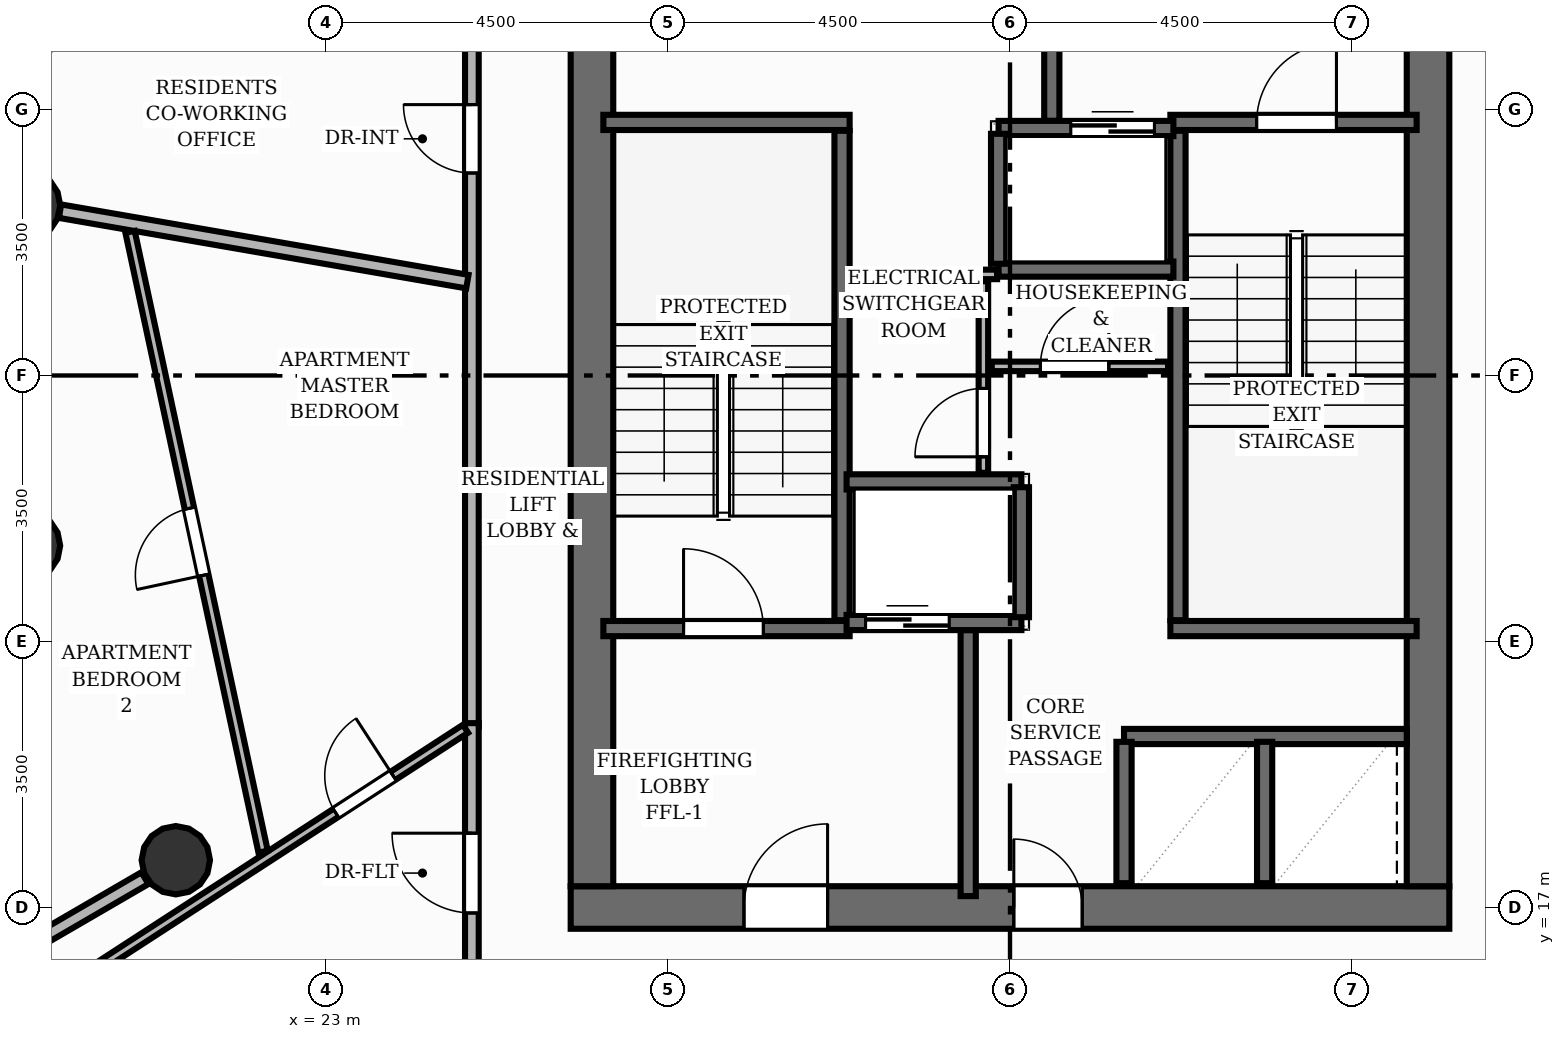
"""IFC4 building model, lengths in metres.
Left out: names, types, materials, properties, quantities, classifications, styles, units other than length and angle.
Written with IfcOpenShell. Run it as: python <this file> out.ifc"""

import sys

from ifc_helpers import new_model, si_unit, direction, frame, frame_2d, origin, origin_2d, place, context, subcontext, project, spatial, rectangle, circle, extrude, element, fill, save


model = new_model("IFC4")
c1 = context("Model", 3, precision=1e-05, world=origin(), true_north=direction((0.0, 1.0)))
c2 = subcontext(c1, "Body", "Model", "MODEL_VIEW")
j1 = project(units=[si_unit("LENGTHUNIT", "METRE"), si_unit("PLANEANGLEUNIT", "RADIAN")], contexts=[c1])
p1 = place(None, origin())
s1 = spatial("IfcSite", under=j1, at=p1, CompositionType="ELEMENT")
p2 = place(p1, origin())
s2 = spatial("IfcBuilding", under=s1, at=p2, CompositionType="ELEMENT")
p3 = place(p2, frame((0.0, 0.0, 185.44)))
s3 = spatial("IfcBuildingStorey", under=s2, at=p3, CompositionType="ELEMENT", Elevation=185.44)
p4 = place(p3, frame((26.22, 17.0, 0.0), z_axis=(0.0, 0.0, 1.0), x_axis=(1.0, 0.0, 0.0)))
e1 = element("IfcWall", 1, at=p4, inside=s3, PredefinedType="SHEAR", context=c2, shape_type="SweptSolid", body=[
    extrude(rectangle(XDim=11.56, YDim=0.56, at=frame_2d((5.78, 0.0))), origin(), (0.0, 0.0, 1.0), 3.2),
])
p5 = place(p4, frame((2.28, 0.0, 0.0)))
e2 = element("IfcOpeningElement", 2, at=p5, cuts=e1, PredefinedType="OPENING", context=c2, shape_type="SweptSolid", body=[
    extrude(rectangle(XDim=1.1, YDim=2.15, at=frame_2d((0.55, 1.075))), frame((0.0, 0.29, 0.0), z_axis=(0.0, -1.0, 0.0), x_axis=(1.0, 0.0, 0.0)), (0.0, 0.0, 1.0), 0.58),
])
p6 = place(p4, frame((5.83, 0.0, 0.0)))
e3 = element("IfcOpeningElement", 3, at=p6, cuts=e1, PredefinedType="OPENING", context=c2, shape_type="SweptSolid", body=[
    extrude(rectangle(XDim=0.9, YDim=2.1, at=frame_2d((0.45, 1.05))), frame((0.0, 0.29, 0.0), z_axis=(0.0, -1.0, 0.0), x_axis=(1.0, 0.0, 0.0)), (0.0, 0.0, 1.0), 0.58),
])
for number, where, z_axis, x_axis in (
    (4, (26.5, 17.28, 0.0), (0.0, 0.0, 1.0), (0.0, 1.0, 0.0)),
    (5, (37.5, 17.28, 0.0), (0.0, 0.0, 1.0), (0.0, 1.0, 0.0)),
):
    element("IfcWall", number, at=place(p3, frame(where, z_axis=z_axis, x_axis=x_axis)), inside=s3, PredefinedType="SHEAR", context=c2, shape_type="SweptSolid", body=[
        extrude(rectangle(XDim=13.44, YDim=0.56, at=frame_2d((6.72, 0.0))), origin(), (0.0, 0.0, 1.0), 3.2),
    ])
for number, where, z_axis, x_axis in (
    (6, (19.054, 26.24, 0.0), (0.0, 0.0, 1.0), (1.0, 0.0, 0.0)),
    (7, (19.054, 21.76, 0.0), (0.0, 0.0, 1.0), (1.0, 0.0, 0.0)),
    (8, (21.025, 17.622, 0.0), (0.0, 0.0, 1.0), (1.0, 0.0, 0.0)),
):
    element("IfcColumn", number, at=place(p3, frame(where, z_axis=z_axis, x_axis=x_axis)), inside=s3, PredefinedType="COLUMN", context=c2, shape_type="SweptSolid", body=[
        extrude(circle(Radius=0.45, at=origin_2d()), origin(), (0.0, 0.0, 1.0), 3.2),
    ])
p7 = place(p3, frame((18.472, 26.367, 0.0), z_axis=(0.0, 0.0, 1.0), x_axis=(0.370330939431, 0.928899884433, 0.0)))
e9 = element("IfcWall", 9, at=p7, inside=s3, PredefinedType="SOLIDWALL", context=c2, shape_type="SweptSolid", body=[
    extrude(rectangle(XDim=2.702, YDim=0.25, at=frame_2d((1.351, 0.0))), origin(), (0.0, 0.0, 1.0), 2.96),
])
p8 = place(p7, frame((0.651, 0.0, 0.85)))
e10 = element("IfcOpeningElement", 10, at=p8, cuts=e9, PredefinedType="OPENING", context=c2, shape_type="SweptSolid", body=[
    extrude(rectangle(XDim=1.4, YDim=1.55, at=frame_2d((0.7, 0.775))), frame((0.0, 0.135, 0.0), z_axis=(0.0, -1.0, 0.0), x_axis=(1.0, 0.0, 0.0)), (0.0, 0.0, 1.0), 0.27),
])
p9 = place(p3, frame((20.019, 14.733, 0.0), z_axis=(0.0, 0.0, 1.0), x_axis=(-0.485821561791, 0.874058013005, 0.0)))
e11 = element("IfcWall", 11, at=p9, inside=s3, PredefinedType="SOLIDWALL", context=c2, shape_type="SweptSolid", body=[
    extrude(rectangle(XDim=2.437, YDim=0.25, at=frame_2d((1.218, 0.0))), origin(), (0.0, 0.0, 1.0), 2.96),
])
p10 = place(p3, frame((29.79, 20.78, 0.0), z_axis=(0.0, 0.0, 1.0), x_axis=(0.0, 1.0, 0.0)))
e12 = element("IfcWall", 12, at=p10, inside=s3, PredefinedType="SHEAR", context=c2, shape_type="SweptSolid", body=[
    extrude(rectangle(XDim=6.44, YDim=0.2, at=frame_2d((3.22, 0.0))), origin(), (0.0, 0.0, 1.0), 3.2),
])
p11 = place(p3, frame((26.65, 27.33, 0.0), z_axis=(0.0, 0.0, 1.0), x_axis=(1.0, 0.0, 0.0)))
e13 = element("IfcWall", 13, at=p11, inside=s3, PredefinedType="SHEAR", context=c2, shape_type="SweptSolid", body=[
    extrude(rectangle(XDim=3.24, YDim=0.2, at=frame_2d((1.62, 0.0))), origin(), (0.0, 0.0, 1.0), 3.2),
])
p12 = place(p3, frame((26.65, 20.67, 0.0), z_axis=(0.0, 0.0, 1.0), x_axis=(1.0, 0.0, 0.0)))
e14 = element("IfcWall", 14, at=p12, inside=s3, PredefinedType="SHEAR", context=c2, shape_type="SweptSolid", body=[
    extrude(rectangle(XDim=3.24, YDim=0.2, at=frame_2d((1.62, 0.0))), origin(), (0.0, 0.0, 1.0), 3.2),
])
p13 = place(p12, frame((1.055, 0.0, 0.0)))
e15 = element("IfcOpeningElement", 15, at=p13, cuts=e14, PredefinedType="OPENING", context=c2, shape_type="SweptSolid", body=[
    extrude(rectangle(XDim=1.05, YDim=2.15, at=frame_2d((0.525, 1.075))), frame((0.0, 0.11, 0.0), z_axis=(0.0, -1.0, 0.0), x_axis=(1.0, 0.0, 0.0)), (0.0, 0.0, 1.0), 0.22),
])
p14 = place(p3, frame((34.21, 20.78, 0.0), z_axis=(0.0, 0.0, 1.0), x_axis=(0.0, 1.0, 0.0)))
e16 = element("IfcWall", 16, at=p14, inside=s3, PredefinedType="SHEAR", context=c2, shape_type="SweptSolid", body=[
    extrude(rectangle(XDim=6.44, YDim=0.2, at=frame_2d((3.22, 0.0))), origin(), (0.0, 0.0, 1.0), 3.2),
])
p15 = place(p3, frame((34.11, 20.67, 0.0), z_axis=(0.0, 0.0, 1.0), x_axis=(1.0, 0.0, 0.0)))
e17 = element("IfcWall", 17, at=p15, inside=s3, PredefinedType="SHEAR", context=c2, shape_type="SweptSolid", body=[
    extrude(rectangle(XDim=3.24, YDim=0.2, at=frame_2d((1.62, 0.0))), origin(), (0.0, 0.0, 1.0), 3.2),
])
p16 = place(p3, frame((34.11, 27.33, 0.0), z_axis=(0.0, 0.0, 1.0), x_axis=(1.0, 0.0, 0.0)))
e18 = element("IfcWall", 18, at=p16, inside=s3, PredefinedType="SHEAR", context=c2, shape_type="SweptSolid", body=[
    extrude(rectangle(XDim=3.24, YDim=0.2, at=frame_2d((1.62, 0.0))), origin(), (0.0, 0.0, 1.0), 3.2),
])
p17 = place(p16, frame((1.135, 0.0, 0.0)))
e19 = element("IfcOpeningElement", 19, at=p17, cuts=e18, PredefinedType="OPENING", context=c2, shape_type="SweptSolid", body=[
    extrude(rectangle(XDim=1.05, YDim=2.15, at=frame_2d((0.525, 1.075))), frame((0.0, 0.11, 0.0), z_axis=(0.0, -1.0, 0.0), x_axis=(1.0, 0.0, 0.0)), (0.0, 0.0, 1.0), 0.22),
])
for number, where, z_axis, x_axis in (
    (20, (31.45, 17.15, 0.0), (0.0, 0.0, 1.0), (0.0, 1.0, 0.0)),
    (21, (32.55, 27.35, 0.0), (0.0, 0.0, 1.0), (0.0, 1.0, 0.0)),
):
    element("IfcWall", number, at=place(p3, frame(where, z_axis=z_axis, x_axis=x_axis)), inside=s3, PredefinedType="SHEAR", context=c2, shape_type="SweptSolid", body=[
        extrude(rectangle(XDim=3.5, YDim=0.2, at=frame_2d((1.75, 0.0))), origin(), (0.0, 0.0, 1.0), 3.2),
    ])
p18 = place(p3, frame((29.85, 20.75, 0.0), z_axis=(0.0, 0.0, 1.0), x_axis=(1.0, 0.0, 0.0)))
e22 = element("IfcWall", 22, at=p18, inside=s3, PredefinedType="SHEAR", context=c2, shape_type="SweptSolid", body=[
    extrude(rectangle(XDim=2.3, YDim=0.2, at=frame_2d((1.15, 0.0))), origin(), (0.0, 0.0, 1.0), 3.2),
])
p19 = place(p18, frame((0.25, 0.0, 0.0)))
e23 = element("IfcOpeningElement", 23, at=p19, cuts=e22, PredefinedType="OPENING", context=c2, shape_type="SweptSolid", body=[
    extrude(rectangle(XDim=1.1, YDim=2.15, at=frame_2d((0.55, 1.075))), frame((0.0, 0.11, 0.0), z_axis=(0.0, -1.0, 0.0), x_axis=(1.0, 0.0, 0.0)), (0.0, 0.0, 1.0), 0.22),
])
p20 = place(p3, frame((29.85, 22.6, 0.0), z_axis=(0.0, 0.0, 1.0), x_axis=(1.0, 0.0, 0.0)))
e24 = element("IfcWall", 24, at=p20, inside=s3, PredefinedType="SHEAR", context=c2, shape_type="SweptSolid", body=[
    extrude(rectangle(XDim=2.3, YDim=0.2, at=frame_2d((1.15, 0.0))), origin(), (0.0, 0.0, 1.0), 3.2),
])
p21 = place(p3, frame((32.15, 20.82, 0.0), z_axis=(0.0, 0.0, 1.0), x_axis=(0.0, 1.0, 0.0)))
e25 = element("IfcWall", 25, at=p21, inside=s3, PredefinedType="SHEAR", context=c2, shape_type="SweptSolid", body=[
    extrude(rectangle(XDim=1.71, YDim=0.2, at=frame_2d((0.855, 0.0))), origin(), (0.0, 0.0, 1.0), 3.2),
])
p22 = place(p3, frame((31.85, 27.25, 0.0), z_axis=(0.0, 0.0, 1.0), x_axis=(1.0, 0.0, 0.0)))
e26 = element("IfcWall", 26, at=p22, inside=s3, PredefinedType="SHEAR", context=c2, shape_type="SweptSolid", body=[
    extrude(rectangle(XDim=2.3, YDim=0.2, at=frame_2d((1.15, 0.0))), origin(), (0.0, 0.0, 1.0), 3.2),
])
p23 = place(p22, frame((0.95, 0.0, 0.0)))
e27 = element("IfcOpeningElement", 27, at=p23, cuts=e26, PredefinedType="OPENING", context=c2, shape_type="SweptSolid", body=[
    extrude(rectangle(XDim=1.1, YDim=2.15, at=frame_2d((0.55, 1.075))), frame((0.0, 0.11, 0.0), z_axis=(0.0, -1.0, 0.0), x_axis=(1.0, 0.0, 0.0)), (0.0, 0.0, 1.0), 0.22),
])
p24 = place(p3, frame((31.85, 25.4, 0.0), z_axis=(0.0, 0.0, 1.0), x_axis=(1.0, 0.0, 0.0)))
e28 = element("IfcWall", 28, at=p24, inside=s3, PredefinedType="SHEAR", context=c2, shape_type="SweptSolid", body=[
    extrude(rectangle(XDim=2.3, YDim=0.2, at=frame_2d((1.15, 0.0))), origin(), (0.0, 0.0, 1.0), 3.2),
])
p25 = place(p3, frame((31.85, 25.47, 0.0), z_axis=(0.0, 0.0, 1.0), x_axis=(0.0, 1.0, 0.0)))
e29 = element("IfcWall", 29, at=p25, inside=s3, PredefinedType="SHEAR", context=c2, shape_type="SweptSolid", body=[
    extrude(rectangle(XDim=1.71, YDim=0.2, at=frame_2d((0.855, 0.0))), origin(), (0.0, 0.0, 1.0), 3.2),
])
p26 = place(p3, frame((33.5, 19.25, 0.0), z_axis=(0.0, 0.0, 1.0), x_axis=(1.0, 0.0, 0.0)))
e30 = element("IfcWall", 30, at=p26, inside=s3, PredefinedType="SHEAR", context=c2, shape_type="SweptSolid", body=[
    extrude(rectangle(XDim=3.72, YDim=0.2, at=frame_2d((1.86, 0.0))), origin(), (0.0, 0.0, 1.0), 3.2),
])
for number, where, z_axis, x_axis in (
    (31, (33.5, 17.32, 0.0), (0.0, 0.0, 1.0), (0.0, 1.0, 0.0)),
    (32, (35.35, 17.32, 0.0), (0.0, 0.0, 1.0), (0.0, 1.0, 0.0)),
):
    element("IfcWall", number, at=place(p3, frame(where, z_axis=z_axis, x_axis=x_axis)), inside=s3, PredefinedType="SHEAR", context=c2, shape_type="SweptSolid", body=[
        extrude(rectangle(XDim=1.86, YDim=0.2, at=frame_2d((0.93, 0.0))), origin(), (0.0, 0.0, 1.0), 3.2),
    ])
p27 = place(p3, frame((31.65, 22.72, 0.0), z_axis=(0.0, 0.0, 1.0), x_axis=(0.0, 1.0, 0.0)))
e33 = element("IfcWall", 33, at=p27, inside=s3, PredefinedType="PARTITIONING", context=c2, shape_type="SweptSolid", body=[
    extrude(rectangle(XDim=2.52, YDim=0.125, at=frame_2d((1.26, 0.0))), origin(), (0.0, 0.0, 1.0), 2.955),
])
p28 = place(p27, frame((0.21, 0.0, 0.0)))
e34 = element("IfcOpeningElement", 34, at=p28, cuts=e33, PredefinedType="OPENING", context=c2, shape_type="SweptSolid", body=[
    extrude(rectangle(XDim=0.9, YDim=2.1, at=frame_2d((0.45, 1.05))), frame((0.0, 0.073, 0.0), z_axis=(0.0, -1.0, 0.0), x_axis=(1.0, 0.0, 0.0)), (0.0, 0.0, 1.0), 0.145),
])
p29 = place(p3, frame((31.76, 24.12, 0.0), z_axis=(0.0, 0.0, 1.0), x_axis=(1.0, 0.0, 0.0)))
e35 = element("IfcWall", 35, at=p29, inside=s3, PredefinedType="PARTITIONING", context=c2, shape_type="SweptSolid", body=[
    extrude(rectangle(XDim=2.32, YDim=0.125, at=frame_2d((1.16, 0.0))), origin(), (0.0, 0.0, 1.0), 2.955),
])
p30 = place(p29, frame((0.64, 0.0, 0.0)))
e36 = element("IfcOpeningElement", 36, at=p30, cuts=e35, PredefinedType="OPENING", context=c2, shape_type="SweptSolid", body=[
    extrude(rectangle(XDim=0.9, YDim=2.1, at=frame_2d((0.45, 1.05))), frame((0.0, 0.073, 0.0), z_axis=(0.0, -1.0, 0.0), x_axis=(1.0, 0.0, 0.0)), (0.0, 0.0, 1.0), 0.145),
])
p31 = place(p3, frame((29.89, 25.33, 0.0), z_axis=(0.0, 0.0, 1.0), x_axis=(1.0, 0.0, 0.0)))
e37 = element("IfcWall", 37, at=p31, inside=s3, PredefinedType="PARTITIONING", context=c2, shape_type="SweptSolid", body=[
    extrude(rectangle(XDim=1.94, YDim=0.125, at=frame_2d((0.97, 0.0))), origin(), (0.0, 0.0, 1.0), 2.955),
])
p32 = place(p3, frame((20.618, 17.386, 0.0), z_axis=(0.0, 0.0, 1.0), x_axis=(-0.86461381872, -0.502437005482, 0.0)))
e38 = element("IfcWall", 38, at=p32, inside=s3, PredefinedType="PARTITIONING", context=c2, shape_type="SweptSolid", body=[
    extrude(rectangle(XDim=1.758, YDim=0.18, at=frame_2d((0.879, 0.0))), origin(), (0.0, 0.0, 1.0), 2.404),
])
p33 = place(p3, frame((24.92, 19.382, 0.0), z_axis=(0.0, 0.0, 1.0), x_axis=(0.0, 1.0, 0.0)))
e39 = element("IfcWall", 39, at=p33, inside=s3, PredefinedType="PARTITIONING", context=c2, shape_type="SweptSolid", body=[
    extrude(rectangle(XDim=13.198, YDim=0.18, at=frame_2d((6.599, 0.0))), origin(), (0.0, 0.0, 1.0), 2.955),
])
p34 = place(p33, frame((7.282, 0.0, 0.0)))
e40 = element("IfcOpeningElement", 40, at=p34, cuts=e39, PredefinedType="OPENING", context=c2, shape_type="SweptSolid", body=[
    extrude(rectangle(XDim=0.9, YDim=2.1, at=frame_2d((0.45, 1.05))), frame((0.0, 0.1, 0.0), z_axis=(0.0, -1.0, 0.0), x_axis=(1.0, 0.0, 0.0)), (0.0, 0.0, 1.0), 0.2),
])
p35 = place(p3, frame((24.92, 15.48, 0.0), z_axis=(0.0, 0.0, 1.0), x_axis=(0.0, 1.0, 0.0)))
e41 = element("IfcWall", 41, at=p35, inside=s3, PredefinedType="PARTITIONING", context=c2, shape_type="SweptSolid", body=[
    extrude(rectangle(XDim=3.946, YDim=0.18, at=frame_2d((1.973, 0.0))), origin(), (0.0, 0.0, 1.0), 2.955),
])
p36 = place(p35, frame((1.448, 0.0, 0.0)))
e42 = element("IfcOpeningElement", 42, at=p36, cuts=e41, PredefinedType="OPENING", context=c2, shape_type="SweptSolid", body=[
    extrude(rectangle(XDim=1.05, YDim=2.15, at=frame_2d((0.525, 1.075))), frame((0.0, 0.1, 0.0), z_axis=(0.0, -1.0, 0.0), x_axis=(1.0, 0.0, 0.0)), (0.0, 0.0, 1.0), 0.2),
])
p37 = place(p3, frame((24.861, 25.235, 0.0), z_axis=(0.0, 0.0, 1.0), x_axis=(-0.985368487575, 0.170437506711, 0.0)))
e43 = element("IfcWall", 43, at=p37, inside=s3, PredefinedType="PARTITIONING", context=c2, shape_type="SweptSolid", body=[
    extrude(rectangle(XDim=5.439, YDim=0.18, at=frame_2d((2.719, 0.0))), origin(), (0.0, 0.0, 1.0), 2.404),
])
p38 = place(p3, frame((19.422, 15.838, 0.0), z_axis=(0.0, 0.0, 1.0), x_axis=(0.838876327826, 0.544322061479, 0.0)))
e44 = element("IfcWall", 44, at=p38, inside=s3, PredefinedType="PARTITIONING", context=c2, shape_type="SweptSolid", body=[
    extrude(rectangle(XDim=6.454, YDim=0.125, at=frame_2d((3.227, 0.0))), origin(), (0.0, 0.0, 1.0), 2.955),
])
p39 = place(p38, frame((4.419, 0.0, 0.0)))
e45 = element("IfcOpeningElement", 45, at=p39, cuts=e44, PredefinedType="OPENING", context=c2, shape_type="SweptSolid", body=[
    extrude(rectangle(XDim=0.9, YDim=2.1, at=frame_2d((0.45, 1.05))), frame((0.0, 0.073, 0.0), z_axis=(0.0, -1.0, 0.0), x_axis=(1.0, 0.0, 0.0)), (0.0, 0.0, 1.0), 0.145),
])
p40 = place(p3, frame((22.173, 17.735, 0.0), z_axis=(0.0, 0.0, 1.0), x_axis=(-0.20987090056, 0.977729106194, 0.0)))
e46 = element("IfcWall", 46, at=p40, inside=s3, PredefinedType="PARTITIONING", context=c2, shape_type="SweptSolid", body=[
    extrude(rectangle(XDim=8.341, YDim=0.125, at=frame_2d((4.17, 0.0))), origin(), (0.0, 0.0, 1.0), 2.955),
])
p41 = place(p40, frame((3.72, 0.0, 0.0)))
e47 = element("IfcOpeningElement", 47, at=p41, cuts=e46, PredefinedType="OPENING", context=c2, shape_type="SweptSolid", body=[
    extrude(rectangle(XDim=0.9, YDim=2.1, at=frame_2d((0.45, 1.05))), frame((0.0, 0.073, 0.0), z_axis=(0.0, -1.0, 0.0), x_axis=(1.0, 0.0, 0.0)), (0.0, 0.0, 1.0), 0.145),
])
p42 = place(p13, origin())
e48 = element("IfcDoor", 48, at=p42, inside=s3, OperationType="SINGLE_SWING_LEFT", PredefinedType="DOOR", context=c2, shape_type="SweptSolid", body=[
    extrude(rectangle(XDim=1.05, YDim=2.15, at=frame_2d((0.525, 1.075))), frame((0.0, 0.025, 0.0), z_axis=(0.0, -1.0, 0.0), x_axis=(1.0, 0.0, 0.0)), (0.0, 0.0, 1.0), 0.05),
])
fill(e15, e48)
p43 = place(p17, origin())
e49 = element("IfcDoor", 49, at=p43, inside=s3, OperationType="SINGLE_SWING_RIGHT", PredefinedType="DOOR", context=c2, shape_type="SweptSolid", body=[
    extrude(rectangle(XDim=1.05, YDim=2.15, at=frame_2d((0.525, 1.075))), frame((0.0, 0.025, 0.0), z_axis=(0.0, -1.0, 0.0), x_axis=(1.0, 0.0, 0.0)), (0.0, 0.0, 1.0), 0.05),
])
fill(e19, e49)
p44 = place(p5, origin())
e50 = element("IfcDoor", 50, at=p44, inside=s3, OperationType="SINGLE_SWING_RIGHT", PredefinedType="DOOR", context=c2, shape_type="SweptSolid", body=[
    extrude(rectangle(XDim=1.1, YDim=2.15, at=frame_2d((0.55, 1.075))), frame((0.0, 0.025, 0.0), z_axis=(0.0, -1.0, 0.0), x_axis=(1.0, 0.0, 0.0)), (0.0, 0.0, 1.0), 0.05),
])
fill(e2, e50)
p45 = place(p19, origin())
e51 = element("IfcDoor", 51, at=p45, inside=s3, OperationType="DOUBLE_DOOR_SLIDING", PredefinedType="DOOR", context=c2, shape_type="SweptSolid", body=[
    extrude(rectangle(XDim=1.1, YDim=2.15, at=frame_2d((0.55, 1.075))), frame((0.0, 0.025, 0.0), z_axis=(0.0, -1.0, 0.0), x_axis=(1.0, 0.0, 0.0)), (0.0, 0.0, 1.0), 0.05),
])
fill(e23, e51)
p46 = place(p23, origin())
e52 = element("IfcDoor", 52, at=p46, inside=s3, OperationType="DOUBLE_DOOR_SLIDING", PredefinedType="DOOR", context=c2, shape_type="SweptSolid", body=[
    extrude(rectangle(XDim=1.1, YDim=2.15, at=frame_2d((0.55, 1.075))), frame((0.0, 0.025, 0.0), z_axis=(0.0, -1.0, 0.0), x_axis=(1.0, 0.0, 0.0)), (0.0, 0.0, 1.0), 0.05),
])
fill(e27, e52)
p47 = place(p6, origin())
e53 = element("IfcDoor", 53, at=p47, inside=s3, OperationType="SINGLE_SWING_LEFT", PredefinedType="DOOR", context=c2, shape_type="SweptSolid", body=[
    extrude(rectangle(XDim=0.9, YDim=2.1, at=frame_2d((0.45, 1.05))), frame((0.0, 0.025, 0.0), z_axis=(0.0, -1.0, 0.0), x_axis=(1.0, 0.0, 0.0)), (0.0, 0.0, 1.0), 0.05),
])
fill(e3, e53)
p48 = place(p28, origin())
e54 = element("IfcDoor", 54, at=p48, inside=s3, OperationType="SINGLE_SWING_LEFT", PredefinedType="DOOR", context=c2, shape_type="SweptSolid", body=[
    extrude(rectangle(XDim=0.9, YDim=2.1, at=frame_2d((0.45, 1.05))), frame((0.0, 0.025, 0.0), z_axis=(0.0, -1.0, 0.0), x_axis=(1.0, 0.0, 0.0)), (0.0, 0.0, 1.0), 0.05),
])
fill(e34, e54)
p49 = place(p30, origin())
e55 = element("IfcDoor", 55, at=p49, inside=s3, OperationType="SINGLE_SWING_RIGHT", PredefinedType="DOOR", context=c2, shape_type="SweptSolid", body=[
    extrude(rectangle(XDim=0.9, YDim=2.1, at=frame_2d((0.45, 1.05))), frame((0.0, 0.025, 0.0), z_axis=(0.0, -1.0, 0.0), x_axis=(1.0, 0.0, 0.0)), (0.0, 0.0, 1.0), 0.05),
])
fill(e36, e55)
p50 = place(p34, origin())
e56 = element("IfcDoor", 56, at=p50, inside=s3, OperationType="SINGLE_SWING_RIGHT", PredefinedType="DOOR", context=c2, shape_type="SweptSolid", body=[
    extrude(rectangle(XDim=0.9, YDim=2.1, at=frame_2d((0.45, 1.05))), frame((0.0, 0.025, 0.0), z_axis=(0.0, -1.0, 0.0), x_axis=(1.0, 0.0, 0.0)), (0.0, 0.0, 1.0), 0.05),
])
fill(e40, e56)
p51 = place(p36, origin())
e57 = element("IfcDoor", 57, at=p51, inside=s3, OperationType="SINGLE_SWING_RIGHT", PredefinedType="DOOR", context=c2, shape_type="SweptSolid", body=[
    extrude(rectangle(XDim=1.05, YDim=2.15, at=frame_2d((0.525, 1.075))), frame((0.0, 0.025, 0.0), z_axis=(0.0, -1.0, 0.0), x_axis=(1.0, 0.0, 0.0)), (0.0, 0.0, 1.0), 0.05),
])
fill(e42, e57)
p52 = place(p39, origin())
e58 = element("IfcDoor", 58, at=p52, inside=s3, OperationType="SINGLE_SWING_RIGHT", PredefinedType="DOOR", context=c2, shape_type="SweptSolid", body=[
    extrude(rectangle(XDim=0.9, YDim=2.1, at=frame_2d((0.45, 1.05))), frame((0.0, 0.025, 0.0), z_axis=(0.0, -1.0, 0.0), x_axis=(1.0, 0.0, 0.0)), (0.0, 0.0, 1.0), 0.05),
])
fill(e45, e58)
p53 = place(p41, origin())
e59 = element("IfcDoor", 59, at=p53, inside=s3, OperationType="SINGLE_SWING_LEFT", PredefinedType="DOOR", context=c2, shape_type="SweptSolid", body=[
    extrude(rectangle(XDim=0.9, YDim=2.1, at=frame_2d((0.45, 1.05))), frame((0.0, 0.025, 0.0), z_axis=(0.0, -1.0, 0.0), x_axis=(1.0, 0.0, 0.0)), (0.0, 0.0, 1.0), 0.05),
])
fill(e47, e59)
save(model, sys.argv[1])
